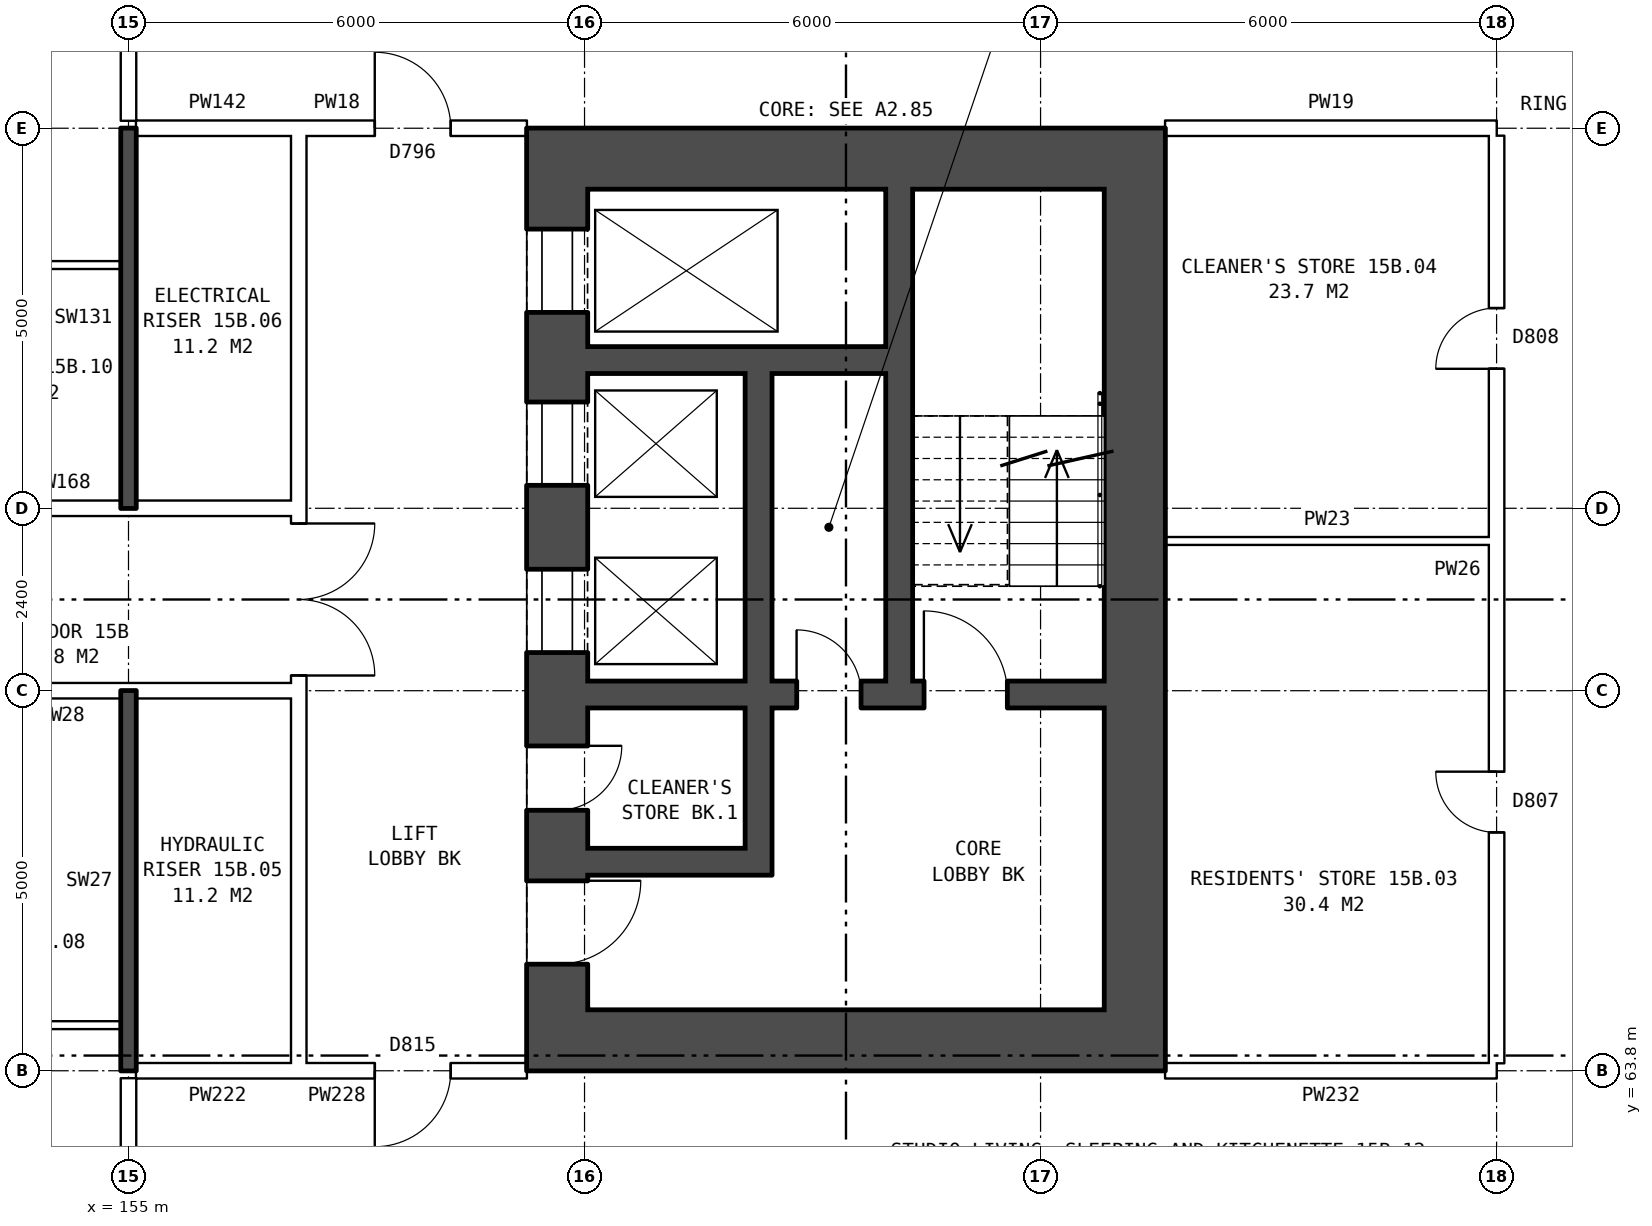
"""IFC4 building model, lengths in metres.
Left out: names, types, materials, properties, quantities, classifications, styles, units other than length and angle.
Written with IfcOpenShell. Run it as: python <this file> out.ifc"""

import sys

from ifc_helpers import new_model, si_unit, direction, frame, frame_2d, origin, place, context, subcontext, project, spatial, rectangle, extrude, element, fill, save


model = new_model("IFC4")
c1 = context("Model", 3, precision=1e-05, world=origin(), true_north=direction((0.0, 1.0)))
c2 = subcontext(c1, "Body", "Model", "MODEL_VIEW")
j1 = project(units=[si_unit("LENGTHUNIT", "METRE"), si_unit("PLANEANGLEUNIT", "RADIAN")], contexts=[c1])
p1 = place(None, origin())
s1 = spatial("IfcSite", under=j1, at=p1, CompositionType="ELEMENT")
p2 = place(p1, origin())
s2 = spatial("IfcBuilding", under=s1, at=p2, CompositionType="ELEMENT")
p3 = place(p2, frame((0.0, 0.0, 56.7)))
s3 = spatial("IfcBuildingStorey", under=s2, at=p3, CompositionType="ELEMENT", Elevation=56.7)
p4 = place(p3, frame((160.64, 75.4, 0.0), z_axis=(0.0, 0.0, 1.0), x_axis=(0.0, -1.0, 0.0)))
e1 = element("IfcWall", 1, at=p4, inside=s3, PredefinedType="SHEAR", context=c2, shape_type="SweptSolid", body=[
    extrude(rectangle(XDim=10.8, YDim=0.8, at=frame_2d((5.4, 0.0))), origin(), (0.0, 0.0, 1.0), 2.85),
])
p5 = place(p4, frame((0.525, 0.0, 0.0)))
e2 = element("IfcOpeningElement", 2, at=p5, cuts=e1, PredefinedType="OPENING", context=c2, shape_type="SweptSolid", body=[
    extrude(rectangle(XDim=1.1, YDim=2.1, at=frame_2d((0.55, 1.05))), frame((0.0, 0.41, 0.0), z_axis=(0.0, -1.0, 0.0), x_axis=(1.0, 0.0, 0.0)), (0.0, 0.0, 1.0), 0.82),
])
p6 = place(p4, frame((2.8, 0.0, 0.0)))
e3 = element("IfcOpeningElement", 3, at=p6, cuts=e1, PredefinedType="OPENING", context=c2, shape_type="SweptSolid", body=[
    extrude(rectangle(XDim=1.1, YDim=2.1, at=frame_2d((0.55, 1.05))), frame((0.0, 0.41, 0.0), z_axis=(0.0, -1.0, 0.0), x_axis=(1.0, 0.0, 0.0)), (0.0, 0.0, 1.0), 0.82),
])
p7 = place(p4, frame((5.0, 0.0, 0.0)))
e4 = element("IfcOpeningElement", 4, at=p7, cuts=e1, PredefinedType="OPENING", context=c2, shape_type="SweptSolid", body=[
    extrude(rectangle(XDim=1.1, YDim=2.1, at=frame_2d((0.55, 1.05))), frame((0.0, 0.41, 0.0), z_axis=(0.0, -1.0, 0.0), x_axis=(1.0, 0.0, 0.0)), (0.0, 0.0, 1.0), 0.82),
])
p8 = place(p4, frame((9.1, 0.0, 0.0)))
e5 = element("IfcOpeningElement", 5, at=p8, cuts=e1, PredefinedType="OPENING", context=c2, shape_type="SweptSolid", body=[
    extrude(rectangle(XDim=1.1, YDim=2.1, at=frame_2d((0.55, 1.05))), frame((0.0, 0.41, 0.0), z_axis=(0.0, -1.0, 0.0), x_axis=(1.0, 0.0, 0.0)), (0.0, 0.0, 1.0), 0.82),
])
p9 = place(p4, frame((7.325, 0.0, 0.0)))
e6 = element("IfcOpeningElement", 6, at=p9, cuts=e1, PredefinedType="OPENING", context=c2, shape_type="SweptSolid", body=[
    extrude(rectangle(XDim=0.85, YDim=2.1, at=frame_2d((0.425, 1.05))), frame((0.0, 0.41, 0.0), z_axis=(0.0, -1.0, 0.0), x_axis=(1.0, 0.0, 0.0)), (0.0, 0.0, 1.0), 0.82),
])
p10 = place(p3, frame((168.24, 75.4, 0.0), z_axis=(0.0, 0.0, 1.0), x_axis=(0.0, -1.0, 0.0)))
e7 = element("IfcWall", 7, at=p10, inside=s3, PredefinedType="SHEAR", context=c2, shape_type="SweptSolid", body=[
    extrude(rectangle(XDim=10.8, YDim=0.8, at=frame_2d((5.4, 0.0))), origin(), (0.0, 0.0, 1.0), 2.85),
])
for number, where, z_axis, x_axis in (
    (8, (160.24, 75.8, 0.0), (0.0, 0.0, 1.0), (1.0, 0.0, 0.0)),
    (9, (160.24, 64.2, 0.0), (0.0, 0.0, 1.0), (1.0, 0.0, 0.0)),
):
    element("IfcWall", number, at=place(p3, frame(where, z_axis=z_axis, x_axis=x_axis)), inside=s3, PredefinedType="SHEAR", context=c2, shape_type="SweptSolid", body=[
        extrude(rectangle(XDim=8.4, YDim=0.8, at=frame_2d((4.2, 0.0))), origin(), (0.0, 0.0, 1.0), 2.85),
    ])
p11 = place(p3, frame((161.04, 73.15, 0.0), z_axis=(0.0, 0.0, 1.0), x_axis=(1.0, 0.0, 0.0)))
e10 = element("IfcWall", 10, at=p11, inside=s3, PredefinedType="SHEAR", context=c2, shape_type="SweptSolid", body=[
    extrude(rectangle(XDim=3.925, YDim=0.35, at=frame_2d((1.962, 0.0))), origin(), (0.0, 0.0, 1.0), 2.85),
])
p12 = place(p3, frame((161.04, 68.75, 0.0), z_axis=(0.0, 0.0, 1.0), x_axis=(1.0, 0.0, 0.0)))
e11 = element("IfcWall", 11, at=p12, inside=s3, PredefinedType="SHEAR", context=c2, shape_type="SweptSolid", body=[
    extrude(rectangle(XDim=6.8, YDim=0.35, at=frame_2d((3.4, 0.0))), origin(), (0.0, 0.0, 1.0), 2.85),
])
p13 = place(p12, frame((4.425, 0.0, 0.0)))
e12 = element("IfcOpeningElement", 12, at=p13, cuts=e11, PredefinedType="OPENING", context=c2, shape_type="SweptSolid", body=[
    extrude(rectangle(XDim=1.1, YDim=2.1, at=frame_2d((0.55, 1.05))), frame((0.0, 0.185, 0.0), z_axis=(0.0, -1.0, 0.0), x_axis=(1.0, 0.0, 0.0)), (0.0, 0.0, 1.0), 0.37),
])
p14 = place(p12, frame((2.75, 0.0, 0.0)))
e13 = element("IfcOpeningElement", 13, at=p14, cuts=e11, PredefinedType="OPENING", context=c2, shape_type="SweptSolid", body=[
    extrude(rectangle(XDim=0.85, YDim=2.1, at=frame_2d((0.425, 1.05))), frame((0.0, 0.185, 0.0), z_axis=(0.0, -1.0, 0.0), x_axis=(1.0, 0.0, 0.0)), (0.0, 0.0, 1.0), 0.37),
])
p15 = place(p3, frame((161.04, 66.55, 0.0), z_axis=(0.0, 0.0, 1.0), x_axis=(1.0, 0.0, 0.0)))
e14 = element("IfcWall", 14, at=p15, inside=s3, PredefinedType="SHEAR", context=c2, shape_type="SweptSolid", body=[
    extrude(rectangle(XDim=2.075, YDim=0.35, at=frame_2d((1.038, 0.0))), origin(), (0.0, 0.0, 1.0), 2.85),
])
p16 = place(p3, frame((163.29, 72.975, 0.0), z_axis=(0.0, 0.0, 1.0), x_axis=(0.0, -1.0, 0.0)))
e15 = element("IfcWall", 15, at=p16, inside=s3, PredefinedType="SHEAR", context=c2, shape_type="SweptSolid", body=[
    extrude(rectangle(XDim=4.05, YDim=0.35, at=frame_2d((2.025, 0.0))), origin(), (0.0, 0.0, 1.0), 2.85),
])
p17 = place(p3, frame((163.29, 68.575, 0.0), z_axis=(0.0, 0.0, 1.0), x_axis=(0.0, -1.0, 0.0)))
e16 = element("IfcWall", 16, at=p17, inside=s3, PredefinedType="SHEAR", context=c2, shape_type="SweptSolid", body=[
    extrude(rectangle(XDim=2.2, YDim=0.35, at=frame_2d((1.1, 0.0))), origin(), (0.0, 0.0, 1.0), 2.85),
])
p18 = place(p3, frame((165.14, 75.4, 0.0), z_axis=(0.0, 0.0, 1.0), x_axis=(0.0, -1.0, 0.0)))
e17 = element("IfcWall", 17, at=p18, inside=s3, PredefinedType="SHEAR", context=c2, shape_type="SweptSolid", body=[
    extrude(rectangle(XDim=6.475, YDim=0.35, at=frame_2d((3.237, 0.0))), origin(), (0.0, 0.0, 1.0), 2.85),
])
p19 = place(p3, frame((157.24, 63.9, 0.0), z_axis=(0.0, 0.0, 1.0), x_axis=(0.0, 1.0, 0.0)))
e18 = element("IfcWall", 18, at=p19, inside=s3, PredefinedType="PARTITIONING", context=c2, shape_type="SweptSolid", body=[
    extrude(rectangle(XDim=12.2, YDim=0.2, at=frame_2d((6.1, 0.0))), origin(), (0.0, 0.0, 1.0), 2.85),
])
p20 = place(p19, frame((5.1, 0.0, 0.0)))
e19 = element("IfcOpeningElement", 19, at=p20, cuts=e18, PredefinedType="OPENING", context=c2, shape_type="SweptSolid", body=[
    extrude(rectangle(XDim=2.0, YDim=2.1, at=frame_2d((1.0, 1.05))), frame((0.0, 0.11, 0.0), z_axis=(0.0, -1.0, 0.0), x_axis=(1.0, 0.0, 0.0)), (0.0, 0.0, 1.0), 0.22),
])
p21 = place(p3, frame((155.1, 63.8, 0.0), z_axis=(0.0, 0.0, 1.0), x_axis=(1.0, 0.0, 0.0)))
e20 = element("IfcWall", 20, at=p21, inside=s3, PredefinedType="PARTITIONING", context=c2, shape_type="SweptSolid", body=[
    extrude(rectangle(XDim=2.14, YDim=0.2, at=frame_2d((1.07, 0.0))), origin(), (0.0, 0.0, 1.0), 2.85),
])
p22 = place(p3, frame((157.24, 63.8, 0.0), z_axis=(0.0, 0.0, 1.0), x_axis=(1.0, 0.0, 0.0)))
e21 = element("IfcWall", 21, at=p22, inside=s3, PredefinedType="PARTITIONING", context=c2, shape_type="SweptSolid", body=[
    extrude(rectangle(XDim=3.0, YDim=0.2, at=frame_2d((1.5, 0.0))), origin(), (0.0, 0.0, 1.0), 2.85),
])
p23 = place(p22, frame((1.0, 0.0, 0.0)))
e22 = element("IfcOpeningElement", 22, at=p23, cuts=e21, PredefinedType="OPENING", context=c2, shape_type="SweptSolid", body=[
    extrude(rectangle(XDim=1.0, YDim=2.1, at=frame_2d((0.5, 1.05))), frame((0.0, 0.11, 0.0), z_axis=(0.0, -1.0, 0.0), x_axis=(1.0, 0.0, 0.0)), (0.0, 0.0, 1.0), 0.22),
])
p24 = place(p3, frame((168.64, 63.8, 0.0), z_axis=(0.0, 0.0, 1.0), x_axis=(1.0, 0.0, 0.0)))
e23 = element("IfcWall", 23, at=p24, inside=s3, PredefinedType="PARTITIONING", context=c2, shape_type="SweptSolid", body=[
    extrude(rectangle(XDim=4.36, YDim=0.2, at=frame_2d((2.18, 0.0))), origin(), (0.0, 0.0, 1.0), 2.85),
])
p25 = place(p3, frame((152.0, 64.4, 0.0), z_axis=(0.0, 0.0, 1.0), x_axis=(1.0, 0.0, 0.0)))
e24 = element("IfcWall", 24, at=p25, inside=s3, PredefinedType="PARTITIONING", context=c2, shape_type="SweptSolid", body=[
    extrude(rectangle(XDim=2.9, YDim=0.1, at=frame_2d((1.45, 0.0))), origin(), (0.0, 0.0, 1.0), 2.85),
])
p26 = place(p3, frame((142.76, 68.8, 0.0), z_axis=(0.0, 0.0, 1.0), x_axis=(1.0, 0.0, 0.0)))
e25 = element("IfcWall", 25, at=p26, inside=s3, PredefinedType="PARTITIONING", context=c2, shape_type="SweptSolid", body=[
    extrude(rectangle(XDim=14.48, YDim=0.2, at=frame_2d((7.24, 0.0))), origin(), (0.0, 0.0, 1.0), 2.85),
])
p27 = place(p26, frame((4.24, 0.0, 0.0)))
e26 = element("IfcOpeningElement", 26, at=p27, cuts=e25, PredefinedType="OPENING", context=c2, shape_type="SweptSolid", body=[
    extrude(rectangle(XDim=1.0, YDim=2.1, at=frame_2d((0.5, 1.05))), frame((0.0, 0.11, 0.0), z_axis=(0.0, -1.0, 0.0), x_axis=(1.0, 0.0, 0.0)), (0.0, 0.0, 1.0), 0.22),
])
p28 = place(p26, frame((7.24, 0.0, 0.0)))
e27 = element("IfcOpeningElement", 27, at=p28, cuts=e25, PredefinedType="OPENING", context=c2, shape_type="SweptSolid", body=[
    extrude(rectangle(XDim=1.0, YDim=2.1, at=frame_2d((0.5, 1.05))), frame((0.0, 0.11, 0.0), z_axis=(0.0, -1.0, 0.0), x_axis=(1.0, 0.0, 0.0)), (0.0, 0.0, 1.0), 0.22),
])
p29 = place(p3, frame((168.64, 70.77, 0.0), z_axis=(0.0, 0.0, 1.0), x_axis=(1.0, 0.0, 0.0)))
e28 = element("IfcWall", 28, at=p29, inside=s3, PredefinedType="PARTITIONING", context=c2, shape_type="SweptSolid", body=[
    extrude(rectangle(XDim=4.26, YDim=0.1, at=frame_2d((2.13, 0.0))), origin(), (0.0, 0.0, 1.0), 2.85),
])
p30 = place(p3, frame((142.76, 71.2, 0.0), z_axis=(0.0, 0.0, 1.0), x_axis=(1.0, 0.0, 0.0)))
e29 = element("IfcWall", 29, at=p30, inside=s3, PredefinedType="PARTITIONING", context=c2, shape_type="SweptSolid", body=[
    extrude(rectangle(XDim=14.48, YDim=0.2, at=frame_2d((7.24, 0.0))), origin(), (0.0, 0.0, 1.0), 2.85),
])
p31 = place(p30, frame((4.24, 0.0, 0.0)))
e30 = element("IfcOpeningElement", 30, at=p31, cuts=e29, PredefinedType="OPENING", context=c2, shape_type="SweptSolid", body=[
    extrude(rectangle(XDim=1.0, YDim=2.1, at=frame_2d((0.5, 1.05))), frame((0.0, 0.11, 0.0), z_axis=(0.0, -1.0, 0.0), x_axis=(1.0, 0.0, 0.0)), (0.0, 0.0, 1.0), 0.22),
])
p32 = place(p30, frame((7.24, 0.0, 0.0)))
e31 = element("IfcOpeningElement", 31, at=p32, cuts=e29, PredefinedType="OPENING", context=c2, shape_type="SweptSolid", body=[
    extrude(rectangle(XDim=1.0, YDim=2.1, at=frame_2d((0.5, 1.05))), frame((0.0, 0.11, 0.0), z_axis=(0.0, -1.0, 0.0), x_axis=(1.0, 0.0, 0.0)), (0.0, 0.0, 1.0), 0.22),
])
p33 = place(p3, frame((152.0, 74.4, 0.0), z_axis=(0.0, 0.0, 1.0), x_axis=(1.0, 0.0, 0.0)))
e32 = element("IfcWall", 32, at=p33, inside=s3, PredefinedType="PARTITIONING", context=c2, shape_type="SweptSolid", body=[
    extrude(rectangle(XDim=2.9, YDim=0.1, at=frame_2d((1.45, 0.0))), origin(), (0.0, 0.0, 1.0), 2.85),
])
p34 = place(p3, frame((155.1, 76.2, 0.0), z_axis=(0.0, 0.0, 1.0), x_axis=(1.0, 0.0, 0.0)))
e33 = element("IfcWall", 33, at=p34, inside=s3, PredefinedType="PARTITIONING", context=c2, shape_type="SweptSolid", body=[
    extrude(rectangle(XDim=2.14, YDim=0.2, at=frame_2d((1.07, 0.0))), origin(), (0.0, 0.0, 1.0), 2.85),
])
p35 = place(p3, frame((157.24, 76.2, 0.0), z_axis=(0.0, 0.0, 1.0), x_axis=(1.0, 0.0, 0.0)))
e34 = element("IfcWall", 34, at=p35, inside=s3, PredefinedType="PARTITIONING", context=c2, shape_type="SweptSolid", body=[
    extrude(rectangle(XDim=3.0, YDim=0.2, at=frame_2d((1.5, 0.0))), origin(), (0.0, 0.0, 1.0), 2.85),
])
p36 = place(p35, frame((1.0, 0.0, 0.0)))
e35 = element("IfcOpeningElement", 35, at=p36, cuts=e34, PredefinedType="OPENING", context=c2, shape_type="SweptSolid", body=[
    extrude(rectangle(XDim=1.0, YDim=2.1, at=frame_2d((0.5, 1.05))), frame((0.0, 0.11, 0.0), z_axis=(0.0, -1.0, 0.0), x_axis=(1.0, 0.0, 0.0)), (0.0, 0.0, 1.0), 0.22),
])
p37 = place(p3, frame((168.64, 76.2, 0.0), z_axis=(0.0, 0.0, 1.0), x_axis=(1.0, 0.0, 0.0)))
e36 = element("IfcWall", 36, at=p37, inside=s3, PredefinedType="PARTITIONING", context=c2, shape_type="SweptSolid", body=[
    extrude(rectangle(XDim=4.36, YDim=0.2, at=frame_2d((2.18, 0.0))), origin(), (0.0, 0.0, 1.0), 2.85),
])
p38 = place(p3, frame((155.0, 61.5, 0.0), z_axis=(0.0, 0.0, 1.0), x_axis=(0.0, 1.0, 0.0)))
e37 = element("IfcWall", 37, at=p38, inside=s3, PredefinedType="PARTITIONING", context=c2, shape_type="SweptSolid", body=[
    extrude(rectangle(XDim=2.2, YDim=0.2, at=frame_2d((1.1, 0.0))), origin(), (0.0, 0.0, 1.0), 2.85),
])
for number, where, z_axis, x_axis in (
    (38, (155.0, 63.8, 0.0), (0.0, 0.0, 1.0), (0.0, 1.0, 0.0)),
    (39, (155.0, 71.2, 0.0), (0.0, 0.0, 1.0), (0.0, 1.0, 0.0)),
):
    element("IfcWall", number, at=place(p3, frame(where, z_axis=z_axis, x_axis=x_axis)), inside=s3, PredefinedType="SOLIDWALL", context=c2, shape_type="SweptSolid", body=[
        extrude(rectangle(XDim=5.0, YDim=0.2, at=frame_2d((2.5, 0.0))), origin(), (0.0, 0.0, 1.0), 2.85),
    ])
p39 = place(p3, frame((155.0, 76.3, 0.0), z_axis=(0.0, 0.0, 1.0), x_axis=(0.0, 1.0, 0.0)))
e40 = element("IfcWall", 40, at=p39, inside=s3, PredefinedType="PARTITIONING", context=c2, shape_type="SweptSolid", body=[
    extrude(rectangle(XDim=2.2, YDim=0.2, at=frame_2d((1.1, 0.0))), origin(), (0.0, 0.0, 1.0), 2.85),
])
p40 = place(p3, frame((173.0, 63.9, 0.0), z_axis=(0.0, 0.0, 1.0), x_axis=(0.0, 1.0, 0.0)))
e41 = element("IfcWall", 41, at=p40, inside=s3, PredefinedType="PARTITIONING", context=c2, shape_type="SweptSolid", body=[
    extrude(rectangle(XDim=12.2, YDim=0.2, at=frame_2d((6.1, 0.0))), origin(), (0.0, 0.0, 1.0), 2.85),
])
p41 = place(p40, frame((3.035, 0.0, 0.0)))
e42 = element("IfcOpeningElement", 42, at=p41, cuts=e41, PredefinedType="OPENING", context=c2, shape_type="SweptSolid", body=[
    extrude(rectangle(XDim=0.8, YDim=2.1, at=frame_2d((0.4, 1.05))), frame((0.0, 0.11, 0.0), z_axis=(0.0, -1.0, 0.0), x_axis=(1.0, 0.0, 0.0)), (0.0, 0.0, 1.0), 0.22),
])
p42 = place(p40, frame((9.135, 0.0, 0.0)))
e43 = element("IfcOpeningElement", 43, at=p42, cuts=e41, PredefinedType="OPENING", context=c2, shape_type="SweptSolid", body=[
    extrude(rectangle(XDim=0.8, YDim=2.1, at=frame_2d((0.4, 1.05))), frame((0.0, 0.11, 0.0), z_axis=(0.0, -1.0, 0.0), x_axis=(1.0, 0.0, 0.0)), (0.0, 0.0, 1.0), 0.22),
])
p43 = place(p5, origin())
e44 = element("IfcDoor", 44, at=p43, inside=s3, OperationType="DOUBLE_DOOR_SLIDING", PredefinedType="DOOR", context=c2, shape_type="SweptSolid", body=[
    extrude(rectangle(XDim=1.1, YDim=2.1, at=frame_2d((0.55, 1.05))), frame((0.0, 0.385, 0.0), z_axis=(0.0, -1.0, 0.0), x_axis=(1.0, 0.0, 0.0)), (0.0, 0.0, 1.0), 0.05),
])
fill(e2, e44)
p44 = place(p6, origin())
e45 = element("IfcDoor", 45, at=p44, inside=s3, OperationType="DOUBLE_DOOR_SLIDING", PredefinedType="DOOR", context=c2, shape_type="SweptSolid", body=[
    extrude(rectangle(XDim=1.1, YDim=2.1, at=frame_2d((0.55, 1.05))), frame((0.0, 0.385, 0.0), z_axis=(0.0, -1.0, 0.0), x_axis=(1.0, 0.0, 0.0)), (0.0, 0.0, 1.0), 0.05),
])
fill(e3, e45)
p45 = place(p7, origin())
e46 = element("IfcDoor", 46, at=p45, inside=s3, OperationType="DOUBLE_DOOR_SLIDING", PredefinedType="DOOR", context=c2, shape_type="SweptSolid", body=[
    extrude(rectangle(XDim=1.1, YDim=2.1, at=frame_2d((0.55, 1.05))), frame((0.0, 0.385, 0.0), z_axis=(0.0, -1.0, 0.0), x_axis=(1.0, 0.0, 0.0)), (0.0, 0.0, 1.0), 0.05),
])
fill(e4, e46)
p46 = place(p8, origin())
e47 = element("IfcDoor", 47, at=p46, inside=s3, OperationType="SINGLE_SWING_LEFT", PredefinedType="DOOR", context=c2, shape_type="SweptSolid", body=[
    extrude(rectangle(XDim=1.1, YDim=2.1, at=frame_2d((0.55, 1.05))), frame((0.0, 0.385, 0.0), z_axis=(0.0, -1.0, 0.0), x_axis=(1.0, 0.0, 0.0)), (0.0, 0.0, 1.0), 0.05),
])
fill(e5, e47)
p47 = place(p13, origin())
e48 = element("IfcDoor", 48, at=p47, inside=s3, OperationType="SINGLE_SWING_LEFT", PredefinedType="DOOR", context=c2, shape_type="SweptSolid", body=[
    extrude(rectangle(XDim=1.1, YDim=2.1, at=frame_2d((0.55, 1.05))), frame((0.0, 0.025, 0.0), z_axis=(0.0, -1.0, 0.0), x_axis=(1.0, 0.0, 0.0)), (0.0, 0.0, 1.0), 0.05),
])
fill(e12, e48)
p48 = place(p9, origin())
e49 = element("IfcDoor", 49, at=p48, inside=s3, OperationType="SINGLE_SWING_LEFT", PredefinedType="DOOR", context=c2, shape_type="SweptSolid", body=[
    extrude(rectangle(XDim=0.85, YDim=2.1, at=frame_2d((0.425, 1.05))), frame((0.0, 0.385, 0.0), z_axis=(0.0, -1.0, 0.0), x_axis=(1.0, 0.0, 0.0)), (0.0, 0.0, 1.0), 0.05),
])
fill(e6, e49)
p49 = place(p14, origin())
e50 = element("IfcDoor", 50, at=p49, inside=s3, OperationType="SINGLE_SWING_LEFT", PredefinedType="DOOR", context=c2, shape_type="SweptSolid", body=[
    extrude(rectangle(XDim=0.85, YDim=2.1, at=frame_2d((0.425, 1.05))), frame((0.0, 0.025, 0.0), z_axis=(0.0, -1.0, 0.0), x_axis=(1.0, 0.0, 0.0)), (0.0, 0.0, 1.0), 0.05),
])
fill(e13, e50)
p50 = place(p20, frame((2.0, 0.0, 0.0), z_axis=(0.0, 0.0, 1.0), x_axis=(-1.0, 0.0, 0.0)))
e51 = element("IfcDoor", 51, at=p50, inside=s3, OperationType="DOUBLE_DOOR_SINGLE_SWING", PredefinedType="DOOR", context=c2, shape_type="SweptSolid", body=[
    extrude(rectangle(XDim=2.0, YDim=2.1, at=frame_2d((1.0, 1.05))), frame((0.0, 0.025, 0.0), z_axis=(0.0, -1.0, 0.0), x_axis=(1.0, 0.0, 0.0)), (0.0, 0.0, 1.0), 0.05),
])
fill(e19, e51)
p51 = place(p23, frame((1.0, 0.0, 0.0), z_axis=(0.0, 0.0, 1.0), x_axis=(-1.0, 0.0, 0.0)))
e52 = element("IfcDoor", 52, at=p51, inside=s3, OperationType="SINGLE_SWING_RIGHT", PredefinedType="DOOR", context=c2, shape_type="SweptSolid", body=[
    extrude(rectangle(XDim=1.0, YDim=2.1, at=frame_2d((0.5, 1.05))), frame((0.0, 0.025, 0.0), z_axis=(0.0, -1.0, 0.0), x_axis=(1.0, 0.0, 0.0)), (0.0, 0.0, 1.0), 0.05),
])
fill(e22, e52)
p52 = place(p36, origin())
e53 = element("IfcDoor", 53, at=p52, inside=s3, OperationType="SINGLE_SWING_LEFT", PredefinedType="DOOR", context=c2, shape_type="SweptSolid", body=[
    extrude(rectangle(XDim=1.0, YDim=2.1, at=frame_2d((0.5, 1.05))), frame((0.0, 0.025, 0.0), z_axis=(0.0, -1.0, 0.0), x_axis=(1.0, 0.0, 0.0)), (0.0, 0.0, 1.0), 0.05),
])
fill(e35, e53)
p53 = place(p41, origin())
e54 = element("IfcDoor", 54, at=p53, inside=s3, OperationType="SINGLE_SWING_RIGHT", PredefinedType="DOOR", context=c2, shape_type="SweptSolid", body=[
    extrude(rectangle(XDim=0.8, YDim=2.1, at=frame_2d((0.4, 1.05))), frame((0.0, 0.025, 0.0), z_axis=(0.0, -1.0, 0.0), x_axis=(1.0, 0.0, 0.0)), (0.0, 0.0, 1.0), 0.05),
])
fill(e42, e54)
p54 = place(p42, origin())
e55 = element("IfcDoor", 55, at=p54, inside=s3, OperationType="SINGLE_SWING_LEFT", PredefinedType="DOOR", context=c2, shape_type="SweptSolid", body=[
    extrude(rectangle(XDim=0.8, YDim=2.1, at=frame_2d((0.4, 1.05))), frame((0.0, 0.025, 0.0), z_axis=(0.0, -1.0, 0.0), x_axis=(1.0, 0.0, 0.0)), (0.0, 0.0, 1.0), 0.05),
])
fill(e43, e55)
save(model, sys.argv[1])
